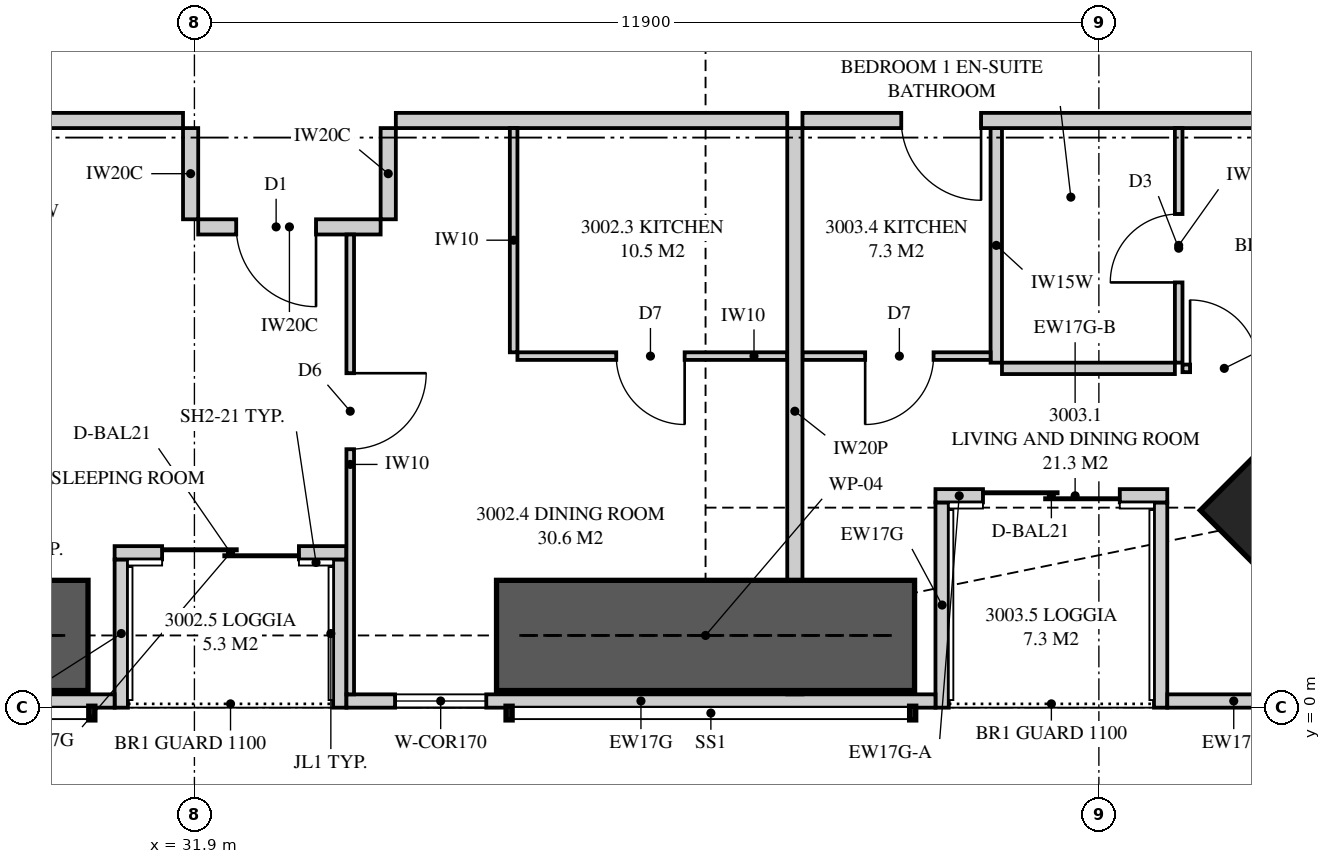
"""IFC4 building model, lengths in metres.
Left out: names, types, materials, properties, quantities, classifications, styles, units other than length and angle.
Written with IfcOpenShell. Run it as: python <this file> out.ifc"""

import sys

from ifc_helpers import new_model, si_unit, direction, frame, frame_2d, origin, origin_2d, place, context, subcontext, project, spatial, polyline, rectangle, outline, extrude, element, fill, save


model = new_model("IFC4")
c1 = context("Model", 3, precision=1e-05, world=origin(), true_north=direction((0.0, 1.0)))
c2 = subcontext(c1, "Body", "Model", "MODEL_VIEW")
j1 = project(units=[si_unit("LENGTHUNIT", "METRE"), si_unit("PLANEANGLEUNIT", "RADIAN")], contexts=[c1])
p1 = place(None, origin())
s1 = spatial("IfcSite", under=j1, at=p1, CompositionType="ELEMENT")
p2 = place(p1, origin())
s2 = spatial("IfcBuilding", under=s1, at=p2, CompositionType="ELEMENT")
p3 = place(p2, frame((0.0, 0.0, 111.55)))
s3 = spatial("IfcBuildingStorey", under=s2, at=p3, CompositionType="ELEMENT", Elevation=111.55)
p4 = place(p3, frame((46.869, 2.631, 0.0), z_axis=(0.0, 0.0, 1.0), x_axis=(-0.707106781187, 0.707106781187, 0.0)))
e1 = element("IfcColumn", 1, at=p4, inside=s3, PredefinedType="COLUMN", context=c2, shape_type="SweptSolid", body=[
    extrude(rectangle(XDim=2.4, YDim=2.5, at=origin_2d()), origin(), (0.0, 0.0, 1.0), 3.35),
])
p5 = place(p3, frame((22.55, 0.087, 0.0), z_axis=(0.0, 0.0, 1.0), x_axis=(1.0, 0.0, 0.0)))
e2 = element("IfcWall", 2, at=p5, inside=s3, PredefinedType="SOLIDWALL", context=c2, shape_type="SweptSolid", body=[
    extrude(rectangle(XDim=8.3, YDim=0.175, at=frame_2d((4.15, 0.0))), origin(), (0.0, 0.0, 1.0), 2.15),
])
p6 = place(p5, frame((0.54, 0.0, 0.4)))
e3 = element("IfcOpeningElement", 3, at=p6, cuts=e2, PredefinedType="OPENING", context=c2, shape_type="SweptSolid", body=[
    extrude(rectangle(XDim=1.8, YDim=1.7, at=frame_2d((0.9, 0.85))), frame((0.0, 0.097, 0.0), z_axis=(0.0, -1.0, 0.0), x_axis=(1.0, 0.0, 0.0)), (0.0, 0.0, 1.0), 0.195),
])
p7 = place(p3, frame((33.9, 0.087, 0.0), z_axis=(0.0, 0.0, 1.0), x_axis=(1.0, 0.0, 0.0)))
e4 = element("IfcWall", 4, at=p7, inside=s3, PredefinedType="SOLIDWALL", context=c2, shape_type="SweptSolid", body=[
    extrude(outline(polyline([(0.0, 0.0), (7.75, 0.0), (7.75, 3.11), (4.928, 3.11), (4.928, 2.15), (4.883, 2.15), (4.883, 3.11), (4.725, 3.11), (4.725, 2.15), (0.0, 2.15), (0.0, 0.0)])), frame((0.0, 0.087, 0.0), z_axis=(0.0, -1.0, 0.0), x_axis=(1.0, 0.0, 0.0)), (0.0, 0.0, 1.0), 0.175),
])
p8 = place(p7, frame((0.64, 0.0, 0.4)))
e5 = element("IfcOpeningElement", 5, at=p8, cuts=e4, PredefinedType="OPENING", context=c2, shape_type="SweptSolid", body=[
    extrude(rectangle(XDim=1.2, YDim=1.7, at=frame_2d((0.6, 0.85))), frame((0.0, 0.097, 0.0), z_axis=(0.0, -1.0, 0.0), x_axis=(1.0, 0.0, 0.0)), (0.0, 0.0, 1.0), 0.195),
])
p9 = place(p3, frame((44.7, 0.087, 0.0), z_axis=(0.0, 0.0, 1.0), x_axis=(1.0, 0.0, 0.0)))
e6 = element("IfcWall", 6, at=p9, inside=s3, PredefinedType="SOLIDWALL", context=c2, shape_type="SweptSolid", body=[
    extrude(rectangle(XDim=1.749, YDim=0.175, at=frame_2d((0.875, 0.0))), origin(), (0.0, 0.0, 1.0), 3.11),
])
p10 = place(p3, frame((30.85, 2.038, 0.0), z_axis=(0.0, 0.0, 1.0), x_axis=(1.0, 0.0, 0.0)))
e7 = element("IfcWall", 7, at=p10, inside=s3, PredefinedType="SOLIDWALL", context=c2, shape_type="SweptSolid", body=[
    extrude(rectangle(XDim=3.05, YDim=0.175, at=frame_2d((1.525, 0.0))), origin(), (0.0, 0.0, 1.0), 3.11),
])
p11 = place(p10, frame((0.625, 0.0, 0.0)))
e8 = element("IfcOpeningElement", 8, at=p11, cuts=e7, PredefinedType="OPENING", context=c2, shape_type="SweptSolid", body=[
    extrude(rectangle(XDim=1.8, YDim=2.1, at=frame_2d((0.9, 1.05))), frame((0.0, 0.097, 0.0), z_axis=(0.0, -1.0, 0.0), x_axis=(1.0, 0.0, 0.0)), (0.0, 0.0, 1.0), 0.195),
])
for number, where, z_axis, x_axis in (
    (9, (30.938, 0.0, 0.0), (0.0, 0.0, 1.0), (0.0, 1.0, 0.0)),
    (10, (33.812, 0.0, 0.0), (0.0, 0.0, 1.0), (0.0, 1.0, 0.0)),
):
    element("IfcWall", number, at=place(p3, frame(where, z_axis=z_axis, x_axis=x_axis)), inside=s3, PredefinedType="SOLIDWALL", context=c2, shape_type="SweptSolid", body=[
        extrude(outline(polyline([(0.0, 0.0), (1.95, 0.0), (1.95, 3.11), (1.75, 3.11), (1.75, 2.15), (0.15, 2.15), (0.15, 3.11), (0.0, 3.11), (0.0, 0.0)])), frame((0.0, 0.087, 0.0), z_axis=(0.0, -1.0, 0.0), x_axis=(1.0, 0.0, 0.0)), (0.0, 0.0, 1.0), 0.175),
    ])
p12 = place(p3, frame((41.65, 2.788, 0.0), z_axis=(0.0, 0.0, 1.0), x_axis=(1.0, 0.0, 0.0)))
e11 = element("IfcWall", 11, at=p12, inside=s3, PredefinedType="SOLIDWALL", context=c2, shape_type="SweptSolid", body=[
    extrude(rectangle(XDim=0.625, YDim=0.175, at=frame_2d((0.312, 0.0))), origin(), (0.0, 0.0, 1.0), 2.51),
])
p13 = place(p3, frame((42.275, 2.788, 0.0), z_axis=(0.0, 0.0, 1.0), x_axis=(1.0, 0.0, 0.0)))
e12 = element("IfcWall", 12, at=p13, inside=s3, PredefinedType="SOLIDWALL", context=c2, shape_type="SweptSolid", body=[
    extrude(rectangle(XDim=2.425, YDim=0.175, at=frame_2d((1.212, 0.0))), origin(), (0.0, 0.0, 1.0), 2.15),
])
p14 = place(p13, origin())
e13 = element("IfcOpeningElement", 13, at=p14, cuts=e12, PredefinedType="OPENING", context=c2, shape_type="SweptSolid", body=[
    extrude(rectangle(XDim=1.8, YDim=2.1, at=frame_2d((0.9, 1.05))), frame((0.0, 0.097, 0.0), z_axis=(0.0, -1.0, 0.0), x_axis=(1.0, 0.0, 0.0)), (0.0, 0.0, 1.0), 0.195),
])
p15 = place(p3, frame((41.738, 0.0, 0.0), z_axis=(0.0, 0.0, 1.0), x_axis=(0.0, 1.0, 0.0)))
e14 = element("IfcWall", 14, at=p15, inside=s3, PredefinedType="SOLIDWALL", context=c2, shape_type="SweptSolid", body=[
    extrude(outline(polyline([(0.0, 0.0), (2.7, 0.0), (2.7, 2.51), (2.419, 2.51), (2.419, 2.15), (0.75, 2.15), (0.75, 3.11), (0.0, 3.11), (0.0, 0.0)])), frame((0.0, 0.087, 0.0), z_axis=(0.0, -1.0, 0.0), x_axis=(1.0, 0.0, 0.0)), (0.0, 0.0, 1.0), 0.175),
])
p16 = place(p3, frame((44.613, 0.0, 0.0), z_axis=(0.0, 0.0, 1.0), x_axis=(0.0, 1.0, 0.0)))
e15 = element("IfcWall", 15, at=p16, inside=s3, PredefinedType="SOLIDWALL", context=c2, shape_type="SweptSolid", body=[
    extrude(outline(polyline([(0.0, 0.0), (2.7, 0.0), (2.7, 2.15), (1.337, 2.15), (1.337, 3.11), (0.0, 3.11), (0.0, 0.0)])), frame((0.0, 0.087, 0.0), z_axis=(0.0, -1.0, 0.0), x_axis=(1.0, 0.0, 0.0)), (0.0, 0.0, 1.0), 0.175),
])
p17 = place(p3, frame((39.8, 0.175, 0.0), z_axis=(0.0, 0.0, 1.0), x_axis=(0.0, 1.0, 0.0)))
e16 = element("IfcWall", 16, at=p17, inside=s3, PredefinedType="PARTITIONING", context=c2, shape_type="SweptSolid", body=[
    extrude(outline(polyline([(0.086, 3.11), (0.0, 3.11), (0.0, 0.0), (0.529, 0.0), (0.529, 0.701), (1.021, 0.701), (1.021, 0.0), (7.45, 0.0), (7.45, 3.11), (3.766, 3.11), (3.766, 2.51), (1.943, 2.51), (1.943, 2.15), (1.021, 2.15), (1.021, 1.449), (0.529, 1.449), (0.529, 2.15), (0.086, 2.15), (0.086, 3.11)])), frame((0.0, 0.1, 0.0), z_axis=(0.0, -1.0, 0.0), x_axis=(1.0, 0.0, 0.0)), (0.0, 0.0, 1.0), 0.2),
])
p18 = place(p3, frame((26.2, 7.725, 0.0), z_axis=(0.0, 0.0, 1.0), x_axis=(1.0, 0.0, 0.0)))
e17 = element("IfcWall", 17, at=p18, inside=s3, PredefinedType="PARTITIONING", context=c2, shape_type="SweptSolid", body=[
    extrude(outline(polyline([(0.0, 0.0), (5.55, 0.0), (5.55, 3.11), (1.887, 3.11), (1.887, 2.541), (1.213, 2.541), (1.213, 3.11), (0.0, 3.11), (0.0, 0.0)])), frame((0.0, 0.1, 0.0), z_axis=(0.0, -1.0, 0.0), x_axis=(1.0, 0.0, 0.0)), (0.0, 0.0, 1.0), 0.2),
])
p19 = place(p3, frame((36.15, 4.625, 0.0), z_axis=(0.0, 0.0, 1.0), x_axis=(1.0, 0.0, 0.0)))
e18 = element("IfcWall", 18, at=p19, inside=s3, PredefinedType="PARTITIONING", context=c2, shape_type="SweptSolid", body=[
    extrude(outline(polyline([(0.0, 0.0), (3.55, 0.0), (3.55, 3.11), (2.762, 3.11), (2.762, 2.541), (2.188, 2.541), (2.188, 3.11), (0.0, 3.11), (0.0, 0.0)])), frame((0.0, 0.05, 0.0), z_axis=(0.0, -1.0, 0.0), x_axis=(1.0, 0.0, 0.0)), (0.0, 0.0, 1.0), 0.1),
])
p20 = place(p19, frame((1.3, 0.0, 0.0)))
e19 = element("IfcOpeningElement", 19, at=p20, cuts=e18, PredefinedType="OPENING", context=c2, shape_type="SweptSolid", body=[
    extrude(rectangle(XDim=0.9, YDim=2.1, at=frame_2d((0.45, 1.05))), frame((0.0, 0.06, 0.0), z_axis=(0.0, -1.0, 0.0), x_axis=(1.0, 0.0, 0.0)), (0.0, 0.0, 1.0), 0.12),
])
p21 = place(p3, frame((36.1, 4.675, 0.0), z_axis=(0.0, 0.0, 1.0), x_axis=(0.0, 1.0, 0.0)))
e20 = element("IfcWall", 20, at=p21, inside=s3, PredefinedType="PARTITIONING", context=c2, shape_type="SweptSolid", body=[
    extrude(rectangle(XDim=2.95, YDim=0.1, at=frame_2d((1.475, 0.0))), origin(), (0.0, 0.0, 1.0), 3.11),
])
p22 = place(p3, frame((33.95, 0.175, 0.0), z_axis=(0.0, 0.0, 1.0), x_axis=(0.0, 1.0, 0.0)))
e21 = element("IfcWall", 21, at=p22, inside=s3, PredefinedType="PARTITIONING", context=c2, shape_type="SweptSolid", body=[
    extrude(outline(polyline([(0.0, 0.0), (6.05, 0.0), (6.05, 3.11), (1.635, 3.11), (1.635, 2.15), (0.0, 2.15), (0.0, 3.11), (0.0, 0.0)])), frame((0.0, 0.05, 0.0), z_axis=(0.0, -1.0, 0.0), x_axis=(1.0, 0.0, 0.0)), (0.0, 0.0, 1.0), 0.1),
])
p23 = place(p22, frame((3.225, 0.0, 0.0)))
e22 = element("IfcOpeningElement", 22, at=p23, cuts=e21, PredefinedType="OPENING", context=c2, shape_type="SweptSolid", body=[
    extrude(rectangle(XDim=1.0, YDim=2.1, at=frame_2d((0.5, 1.05))), frame((0.0, 0.06, 0.0), z_axis=(0.0, -1.0, 0.0), x_axis=(1.0, 0.0, 0.0)), (0.0, 0.0, 1.0), 0.12),
])
p24 = place(p3, frame((39.9, 7.725, 0.0), z_axis=(0.0, 0.0, 1.0), x_axis=(1.0, 0.0, 0.0)))
e23 = element("IfcWall", 23, at=p24, inside=s3, PredefinedType="PARTITIONING", context=c2, shape_type="SweptSolid", body=[
    extrude(rectangle(XDim=6.125, YDim=0.2, at=frame_2d((3.062, 0.0))), origin(), (0.0, 0.0, 1.0), 3.11),
])
p25 = place(p24, frame((1.3, 0.0, 0.0)))
e24 = element("IfcOpeningElement", 24, at=p25, cuts=e23, PredefinedType="OPENING", context=c2, shape_type="SweptSolid", body=[
    extrude(rectangle(XDim=1.05, YDim=2.2, at=frame_2d((0.525, 1.1))), frame((0.0, 0.11, 0.0), z_axis=(0.0, -1.0, 0.0), x_axis=(1.0, 0.0, 0.0)), (0.0, 0.0, 1.0), 0.22),
])
p26 = place(p3, frame((44.85, 4.539, 0.0), z_axis=(0.0, 0.0, 1.0), x_axis=(0.0, 1.0, 0.0)))
e25 = element("IfcWall", 25, at=p26, inside=s3, PredefinedType="PARTITIONING", context=c2, shape_type="SweptSolid", body=[
    extrude(rectangle(XDim=3.086, YDim=0.1, at=frame_2d((1.543, 0.0))), origin(), (0.0, 0.0, 1.0), 3.11),
])
p27 = place(p26, frame((1.056, 0.0, 0.0)))
e26 = element("IfcOpeningElement", 26, at=p27, cuts=e25, PredefinedType="OPENING", context=c2, shape_type="SweptSolid", body=[
    extrude(rectangle(XDim=0.9, YDim=2.1, at=frame_2d((0.45, 1.05))), frame((0.0, 0.06, 0.0), z_axis=(0.0, -1.0, 0.0), x_axis=(1.0, 0.0, 0.0)), (0.0, 0.0, 1.0), 0.12),
])
p28 = place(p3, frame((44.9, 4.464, 0.0), z_axis=(0.0, 0.0, 1.0), x_axis=(1.0, 0.0, 0.0)))
e27 = element("IfcWall", 27, at=p28, inside=s3, PredefinedType="PARTITIONING", context=c2, shape_type="SweptSolid", body=[
    extrude(outline(polyline([(0.0, 0.0), (4.6, 0.0), (4.6, 3.11), (3.137, 3.11), (3.137, 2.15), (1.395, 2.15), (1.395, 3.11), (0.0, 3.11), (0.0, 0.0)])), frame((0.0, 0.05, 0.0), z_axis=(0.0, -1.0, 0.0), x_axis=(1.0, 0.0, 0.0)), (0.0, 0.0, 1.0), 0.1),
])
p29 = place(p28, frame((0.1, 0.0, 0.0)))
e28 = element("IfcOpeningElement", 28, at=p29, cuts=e27, PredefinedType="OPENING", context=c2, shape_type="SweptSolid", body=[
    extrude(rectangle(XDim=0.9, YDim=2.1, at=frame_2d((0.45, 1.05))), frame((0.0, 0.06, 0.0), z_axis=(0.0, -1.0, 0.0), x_axis=(1.0, 0.0, 0.0)), (0.0, 0.0, 1.0), 0.12),
])
p30 = place(p3, frame((42.525, 4.464, 0.0), z_axis=(0.0, 0.0, 1.0), x_axis=(1.0, 0.0, 0.0)))
e29 = element("IfcWall", 29, at=p30, inside=s3, PredefinedType="PLUMBINGWALL", context=c2, shape_type="SweptSolid", body=[
    extrude(rectangle(XDim=2.275, YDim=0.15, at=frame_2d((1.138, 0.0))), origin(), (0.0, 0.0, 1.0), 3.11),
])
p31 = place(p3, frame((42.45, 4.539, 0.0), z_axis=(0.0, 0.0, 1.0), x_axis=(0.0, 1.0, 0.0)))
e30 = element("IfcWall", 30, at=p31, inside=s3, PredefinedType="PLUMBINGWALL", context=c2, shape_type="SweptSolid", body=[
    extrude(rectangle(XDim=3.086, YDim=0.15, at=frame_2d((1.543, 0.0))), origin(), (0.0, 0.0, 1.0), 3.11),
])
p32 = place(p3, frame((39.9, 4.625, 0.0), z_axis=(0.0, 0.0, 1.0), x_axis=(1.0, 0.0, 0.0)))
e31 = element("IfcWall", 31, at=p32, inside=s3, PredefinedType="PARTITIONING", context=c2, shape_type="SweptSolid", body=[
    extrude(rectangle(XDim=2.475, YDim=0.1, at=frame_2d((1.238, 0.0))), origin(), (0.0, 0.0, 1.0), 3.11),
])
p33 = place(p32, frame((0.825, 0.0, 0.0)))
e32 = element("IfcOpeningElement", 32, at=p33, cuts=e31, PredefinedType="OPENING", context=c2, shape_type="SweptSolid", body=[
    extrude(rectangle(XDim=0.9, YDim=2.1, at=frame_2d((0.45, 1.05))), frame((0.0, 0.06, 0.0), z_axis=(0.0, -1.0, 0.0), x_axis=(1.0, 0.0, 0.0)), (0.0, 0.0, 1.0), 0.12),
])
p34 = place(p3, frame((34.55, 7.725, 0.0), z_axis=(0.0, 0.0, 1.0), x_axis=(1.0, 0.0, 0.0)))
e33 = element("IfcWall", 33, at=p34, inside=s3, PredefinedType="PARTITIONING", context=c2, shape_type="SweptSolid", body=[
    extrude(outline(polyline([(0.0, 0.0), (5.15, 0.0), (5.15, 3.11), (4.412, 3.11), (4.412, 2.541), (3.738, 2.541), (3.738, 3.11), (0.0, 3.11), (0.0, 0.0)])), frame((0.0, 0.1, 0.0), z_axis=(0.0, -1.0, 0.0), x_axis=(1.0, 0.0, 0.0)), (0.0, 0.0, 1.0), 0.2),
])
p35 = place(p3, frame((31.95, 6.325, 0.0), z_axis=(0.0, 0.0, 1.0), x_axis=(1.0, 0.0, 0.0)))
e34 = element("IfcWall", 34, at=p35, inside=s3, PredefinedType="PARTITIONING", context=c2, shape_type="SweptSolid", body=[
    extrude(rectangle(XDim=2.4, YDim=0.2, at=frame_2d((1.2, 0.0))), origin(), (0.0, 0.0, 1.0), 3.11),
])
p36 = place(p35, frame((0.5, 0.0, 0.0)))
e35 = element("IfcOpeningElement", 35, at=p36, cuts=e34, PredefinedType="OPENING", context=c2, shape_type="SweptSolid", body=[
    extrude(rectangle(XDim=1.05, YDim=2.2, at=frame_2d((0.525, 1.1))), frame((0.0, 0.11, 0.0), z_axis=(0.0, -1.0, 0.0), x_axis=(1.0, 0.0, 0.0)), (0.0, 0.0, 1.0), 0.22),
])
for number, where, z_axis, x_axis in (
    (36, (31.85, 7.625, 0.0), (0.0, 0.0, 1.0), (0.0, -1.0, 0.0)),
    (37, (34.45, 7.625, 0.0), (0.0, 0.0, 1.0), (0.0, -1.0, 0.0)),
):
    element("IfcWall", number, at=place(p3, frame(where, z_axis=z_axis, x_axis=x_axis)), inside=s3, PredefinedType="PARTITIONING", context=c2, shape_type="SweptSolid", body=[
        extrude(rectangle(XDim=1.2, YDim=0.2, at=frame_2d((0.6, 0.0))), origin(), (0.0, 0.0, 1.0), 3.11),
    ])
for number, where, z_axis, x_axis in (
    (38, (25.0, 0.95, 0.0), (0.0, 0.0, 1.0), (1.0, 0.0, 0.0)),
    (39, (35.875, 0.95, 0.0), (0.0, 0.0, 1.0), (1.0, 0.0, 0.0)),
):
    element("IfcWall", number, at=place(p3, frame(where, z_axis=z_axis, x_axis=x_axis)), inside=s3, PredefinedType="SHEAR", context=c2, shape_type="SweptSolid", body=[
        extrude(rectangle(XDim=5.5, YDim=1.45, at=frame_2d((2.75, 0.0))), origin(), (0.0, 0.0, 1.0), 3.35),
    ])
p37 = place(p11, origin())
e40 = element("IfcDoor", 40, at=p37, inside=s3, OperationType="SLIDING_TO_LEFT", PredefinedType="DOOR", context=c2, shape_type="SweptSolid", body=[
    extrude(rectangle(XDim=1.8, YDim=2.1, at=frame_2d((0.9, 1.05))), frame((0.0, 0.025, 0.0), z_axis=(0.0, -1.0, 0.0), x_axis=(1.0, 0.0, 0.0)), (0.0, 0.0, 1.0), 0.05),
])
fill(e8, e40)
p38 = place(p8, origin())
e41 = element("IfcWindow", 41, at=p38, inside=s3, PartitioningType="SINGLE_PANEL", PredefinedType="WINDOW", context=c2, shape_type="SweptSolid", body=[
    extrude(rectangle(XDim=1.2, YDim=1.7, at=frame_2d((0.6, 0.85))), frame((0.0, 0.03, 0.0), z_axis=(0.0, -1.0, 0.0), x_axis=(1.0, 0.0, 0.0)), (0.0, 0.0, 1.0), 0.06),
])
fill(e5, e41)
p39 = place(p14, origin())
e42 = element("IfcDoor", 42, at=p39, inside=s3, OperationType="SLIDING_TO_LEFT", PredefinedType="DOOR", context=c2, shape_type="SweptSolid", body=[
    extrude(rectangle(XDim=1.8, YDim=2.1, at=frame_2d((0.9, 1.05))), frame((0.0, 0.025, 0.0), z_axis=(0.0, -1.0, 0.0), x_axis=(1.0, 0.0, 0.0)), (0.0, 0.0, 1.0), 0.05),
])
fill(e13, e42)
p40 = place(p36, frame((1.05, 0.0, 0.0), z_axis=(0.0, 0.0, 1.0), x_axis=(-1.0, 0.0, 0.0)))
e43 = element("IfcDoor", 43, at=p40, inside=s3, OperationType="SINGLE_SWING_LEFT", PredefinedType="DOOR", context=c2, shape_type="SweptSolid", body=[
    extrude(rectangle(XDim=1.05, YDim=2.2, at=frame_2d((0.525, 1.1))), frame((0.0, 0.025, 0.0), z_axis=(0.0, -1.0, 0.0), x_axis=(1.0, 0.0, 0.0)), (0.0, 0.0, 1.0), 0.05),
])
fill(e35, e43)
p41 = place(p20, frame((0.9, 0.0, 0.0), z_axis=(0.0, 0.0, 1.0), x_axis=(-1.0, 0.0, 0.0)))
e44 = element("IfcDoor", 44, at=p41, inside=s3, OperationType="SINGLE_SWING_LEFT", PredefinedType="DOOR", context=c2, shape_type="SweptSolid", body=[
    extrude(rectangle(XDim=0.9, YDim=2.1, at=frame_2d((0.45, 1.05))), frame((0.0, 0.025, 0.0), z_axis=(0.0, -1.0, 0.0), x_axis=(1.0, 0.0, 0.0)), (0.0, 0.0, 1.0), 0.05),
])
fill(e19, e44)
p42 = place(p23, frame((1.0, 0.0, 0.0), z_axis=(0.0, 0.0, 1.0), x_axis=(-1.0, 0.0, 0.0)))
e45 = element("IfcDoor", 45, at=p42, inside=s3, OperationType="SINGLE_SWING_LEFT", PredefinedType="DOOR", context=c2, shape_type="SweptSolid", body=[
    extrude(rectangle(XDim=1.0, YDim=2.1, at=frame_2d((0.5, 1.05))), frame((0.0, 0.025, 0.0), z_axis=(0.0, -1.0, 0.0), x_axis=(1.0, 0.0, 0.0)), (0.0, 0.0, 1.0), 0.05),
])
fill(e22, e45)
p43 = place(p25, frame((1.05, 0.0, 0.0), z_axis=(0.0, 0.0, 1.0), x_axis=(-1.0, 0.0, 0.0)))
e46 = element("IfcDoor", 46, at=p43, inside=s3, OperationType="SINGLE_SWING_LEFT", PredefinedType="DOOR", context=c2, shape_type="SweptSolid", body=[
    extrude(rectangle(XDim=1.05, YDim=2.2, at=frame_2d((0.525, 1.1))), frame((0.0, 0.025, 0.0), z_axis=(0.0, -1.0, 0.0), x_axis=(1.0, 0.0, 0.0)), (0.0, 0.0, 1.0), 0.05),
])
fill(e24, e46)
p44 = place(p29, origin())
e47 = element("IfcDoor", 47, at=p44, inside=s3, OperationType="SINGLE_SWING_LEFT", PredefinedType="DOOR", context=c2, shape_type="SweptSolid", body=[
    extrude(rectangle(XDim=0.9, YDim=2.1, at=frame_2d((0.45, 1.05))), frame((0.0, 0.025, 0.0), z_axis=(0.0, -1.0, 0.0), x_axis=(1.0, 0.0, 0.0)), (0.0, 0.0, 1.0), 0.05),
])
fill(e28, e47)
p45 = place(p27, origin())
e48 = element("IfcDoor", 48, at=p45, inside=s3, OperationType="SINGLE_SWING_LEFT", PredefinedType="DOOR", context=c2, shape_type="SweptSolid", body=[
    extrude(rectangle(XDim=0.9, YDim=2.1, at=frame_2d((0.45, 1.05))), frame((0.0, 0.025, 0.0), z_axis=(0.0, -1.0, 0.0), x_axis=(1.0, 0.0, 0.0)), (0.0, 0.0, 1.0), 0.05),
])
fill(e26, e48)
p46 = place(p33, frame((0.9, 0.0, 0.0), z_axis=(0.0, 0.0, 1.0), x_axis=(-1.0, 0.0, 0.0)))
e49 = element("IfcDoor", 49, at=p46, inside=s3, OperationType="SINGLE_SWING_RIGHT", PredefinedType="DOOR", context=c2, shape_type="SweptSolid", body=[
    extrude(rectangle(XDim=0.9, YDim=2.1, at=frame_2d((0.45, 1.05))), frame((0.0, 0.025, 0.0), z_axis=(0.0, -1.0, 0.0), x_axis=(1.0, 0.0, 0.0)), (0.0, 0.0, 1.0), 0.05),
])
fill(e32, e49)
save(model, sys.argv[1])
